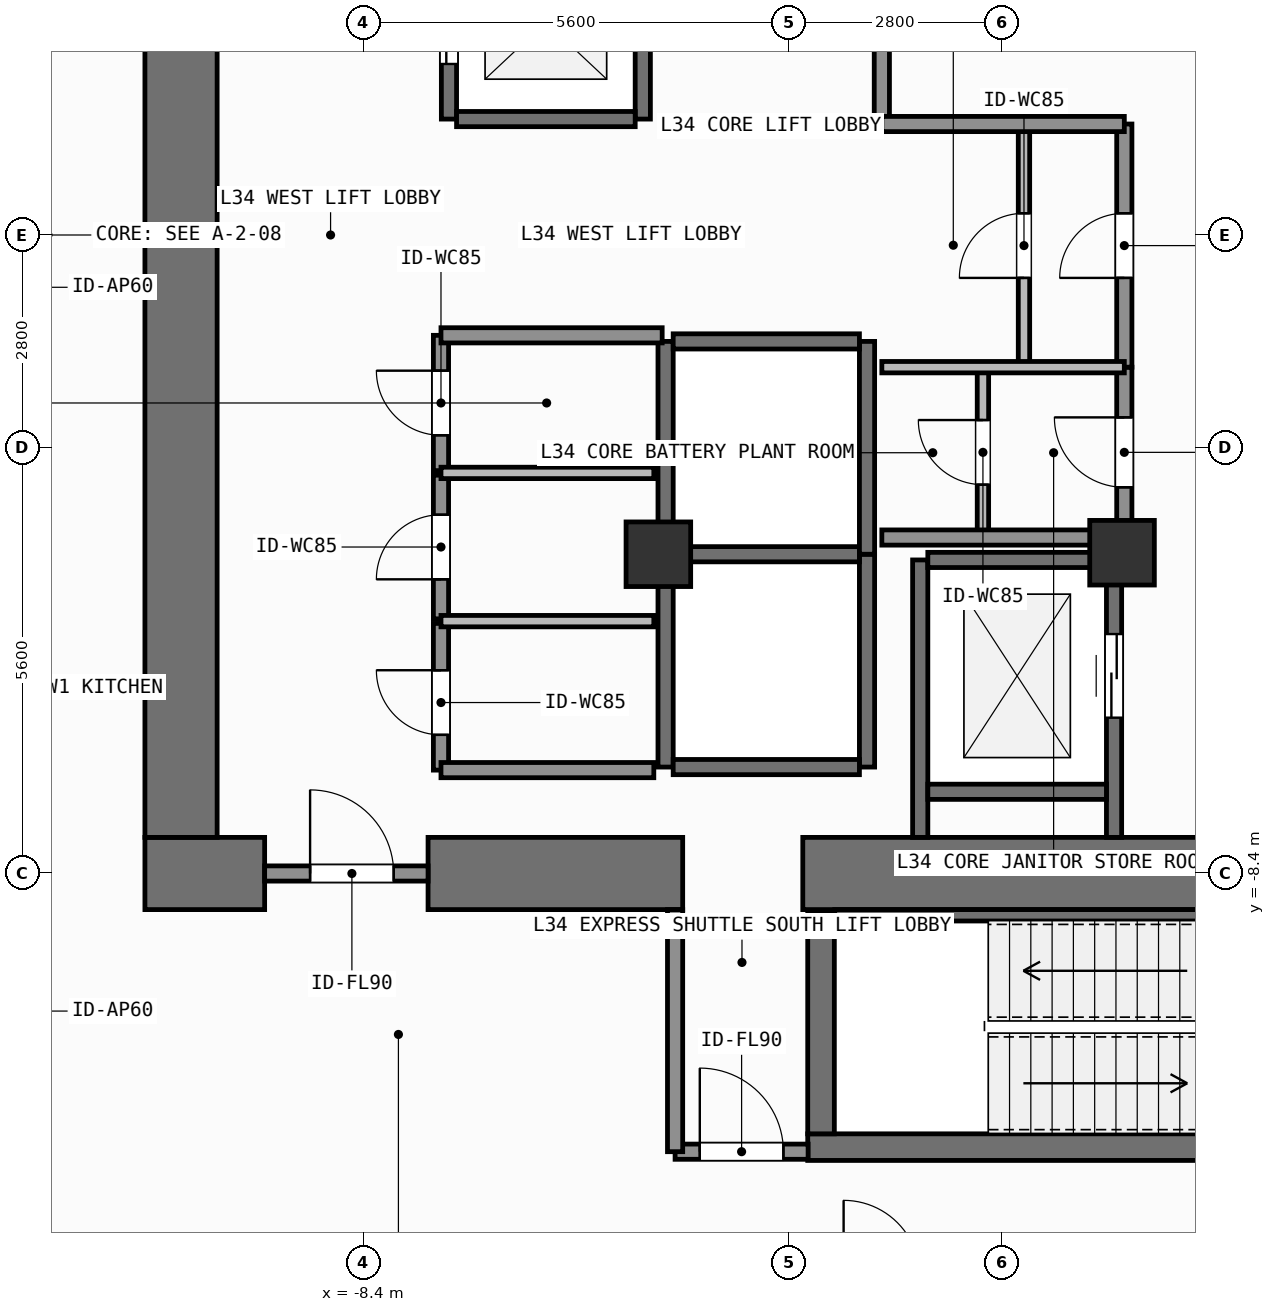
"""IFC4 building model, lengths in metres.
Left out: names, types, materials, properties, quantities, classifications, styles, units other than length and angle.
Written with IfcOpenShell. Run it as: python <this file> out.ifc"""

import sys

from ifc_helpers import new_model, si_unit, direction, frame, frame_2d, origin, origin_2d, place, context, subcontext, project, spatial, rectangle, extrude, element, fill, save


model = new_model("IFC4")
c1 = context("Model", 3, precision=1e-05, world=origin(), true_north=direction((0.0, 1.0)))
c2 = subcontext(c1, "Body", "Model", "MODEL_VIEW")
j1 = project(units=[si_unit("LENGTHUNIT", "METRE"), si_unit("PLANEANGLEUNIT", "RADIAN")], contexts=[c1])
p1 = place(None, origin())
s1 = spatial("IfcSite", under=j1, at=p1, CompositionType="ELEMENT")
p2 = place(p1, origin())
s2 = spatial("IfcBuilding", under=s1, at=p2, CompositionType="ELEMENT")
p3 = place(p2, frame((0.0, 0.0, 136.8)))
s3 = spatial("IfcBuildingStorey", under=s2, at=p3, CompositionType="ELEMENT", Elevation=136.8)
p4 = place(p3, frame((-11.275, -8.4, 0.0), z_axis=(0.0, 0.0, 1.0), x_axis=(1.0, 0.0, 0.0)))
e1 = element("IfcWall", 1, at=p4, inside=s3, PredefinedType="SHEAR", context=c2, shape_type="SweptSolid", body=[
    extrude(rectangle(XDim=1.575, YDim=0.95, at=frame_2d((0.788, 0.0))), origin(), (0.0, 0.0, 1.0), 3.9),
])
p5 = place(p3, frame((-7.55, -8.4, 0.0), z_axis=(0.0, 0.0, 1.0), x_axis=(1.0, 0.0, 0.0)))
e2 = element("IfcWall", 2, at=p5, inside=s3, PredefinedType="SHEAR", context=c2, shape_type="SweptSolid", body=[
    extrude(rectangle(XDim=3.35, YDim=0.95, at=frame_2d((1.675, 0.0))), origin(), (0.0, 0.0, 1.0), 3.9),
])
p6 = place(p3, frame((-2.62, -8.4, 0.0), z_axis=(0.0, 0.0, 1.0), x_axis=(1.0, 0.0, 0.0)))
e3 = element("IfcWall", 3, at=p6, inside=s3, PredefinedType="SHEAR", context=c2, shape_type="SweptSolid", body=[
    extrude(rectangle(XDim=7.27, YDim=0.95, at=frame_2d((3.635, 0.0))), origin(), (0.0, 0.0, 1.0), 3.9),
])
p7 = place(p3, frame((-10.8, -7.925, 0.0), z_axis=(0.0, 0.0, 1.0), x_axis=(0.0, 1.0, 0.0)))
e4 = element("IfcWall", 4, at=p7, inside=s3, PredefinedType="SHEAR", context=c2, shape_type="SweptSolid", body=[
    extrude(rectangle(XDim=15.85, YDim=0.95, at=frame_2d((7.925, 0.0))), origin(), (0.0, 0.0, 1.0), 3.9),
])
p8 = place(p3, frame((-2.555, -12.0, 0.0), z_axis=(0.0, 0.0, 1.0), x_axis=(1.0, 0.0, 0.0)))
e5 = element("IfcWall", 5, at=p8, inside=s3, PredefinedType="SHEAR", context=c2, shape_type="SweptSolid", body=[
    extrude(rectangle(XDim=7.31, YDim=0.35, at=frame_2d((3.655, 0.0))), origin(), (0.0, 0.0, 1.0), 3.9),
])
p9 = place(p3, frame((-2.2, -8.95, 0.0), z_axis=(0.0, 0.0, 1.0), x_axis=(1.0, 0.0, 0.0)))
e6 = element("IfcWall", 6, at=p9, inside=s3, PredefinedType="SHEAR", context=c2, shape_type="SweptSolid", body=[
    extrude(rectangle(XDim=6.6, YDim=0.15, at=frame_2d((3.3, 0.0))), origin(), (0.0, 0.0, 1.0), 3.9),
])
p10 = place(p3, frame((-2.38, -11.825, 0.0), z_axis=(0.0, 0.0, 1.0), x_axis=(0.0, 1.0, 0.0)))
e7 = element("IfcWall", 7, at=p10, inside=s3, PredefinedType="SHEAR", context=c2, shape_type="SweptSolid", body=[
    extrude(rectangle(XDim=2.925, YDim=0.35, at=frame_2d((1.462, 0.0))), origin(), (0.0, 0.0, 1.0), 3.9),
])
for number, where, z_axis, x_axis in (
    (8, (-4.52, -4.2, 0.0), (0.0, 0.0, 1.0), (1.0, 0.0, 0.0)),
    (9, (1.58, -4.18, 0.0), (0.0, 0.0, 1.0), (1.0, 0.0, 0.0)),
):
    element("IfcColumn", number, at=place(p3, frame(where, z_axis=z_axis, x_axis=x_axis)), inside=s3, PredefinedType="COLUMN", context=c2, shape_type="SweptSolid", body=[
        extrude(rectangle(XDim=0.85, YDim=0.85, at=origin_2d()), origin(), (0.0, 0.0, 1.0), 3.9),
    ])
p11 = place(p3, frame((-7.275, 1.525, 0.0), z_axis=(0.0, 0.0, 1.0), x_axis=(0.0, 1.0, 0.0)))
e10 = element("IfcWall", 10, at=p11, inside=s3, PredefinedType="SHEAR", context=c2, shape_type="SweptSolid", body=[
    extrude(rectangle(XDim=2.55, YDim=0.2, at=frame_2d((1.275, 0.0))), origin(), (0.0, 0.0, 1.0), 3.68),
])
p12 = place(p11, frame((0.725, 0.0, 0.0)))
e11 = element("IfcOpeningElement", 11, at=p12, cuts=e10, PredefinedType="OPENING", context=c2, shape_type="SweptSolid", body=[
    extrude(rectangle(XDim=1.1, YDim=2.2, at=frame_2d((0.55, 1.1))), frame((0.0, 0.11, 0.0), z_axis=(0.0, -1.0, 0.0), x_axis=(1.0, 0.0, 0.0)), (0.0, 0.0, 1.0), 0.22),
])
p13 = place(p3, frame((-4.725, 1.525, 0.0), z_axis=(0.0, 0.0, 1.0), x_axis=(0.0, 1.0, 0.0)))
e12 = element("IfcWall", 12, at=p13, inside=s3, PredefinedType="SHEAR", context=c2, shape_type="SweptSolid", body=[
    extrude(rectangle(XDim=2.55, YDim=0.2, at=frame_2d((1.275, 0.0))), origin(), (0.0, 0.0, 1.0), 3.68),
])
p14 = place(p3, frame((-7.175, 1.525, 0.0), z_axis=(0.0, 0.0, 1.0), x_axis=(1.0, 0.0, 0.0)))
e13 = element("IfcWall", 13, at=p14, inside=s3, PredefinedType="SHEAR", context=c2, shape_type="SweptSolid", body=[
    extrude(rectangle(XDim=2.35, YDim=0.2, at=frame_2d((1.175, 0.0))), origin(), (0.0, 0.0, 1.0), 3.68),
])
for number, where, z_axis, x_axis in (
    (14, (-4.425, -7.0, 0.0), (0.0, 0.0, 1.0), (0.0, 1.0, 0.0)),
    (15, (-1.775, -7.0, 0.0), (0.0, 0.0, 1.0), (0.0, 1.0, 0.0)),
):
    element("IfcWall", number, at=place(p3, frame(where, z_axis=z_axis, x_axis=x_axis)), inside=s3, PredefinedType="SHEAR", context=c2, shape_type="SweptSolid", body=[
        extrude(rectangle(XDim=2.8, YDim=0.2, at=frame_2d((1.4, 0.0))), origin(), (0.0, 0.0, 1.0), 3.68),
    ])
for number, where, z_axis, x_axis in (
    (16, (-4.325, -7.0, 0.0), (0.0, 0.0, 1.0), (1.0, 0.0, 0.0)),
    (17, (-4.325, -4.2, 0.0), (0.0, 0.0, 1.0), (1.0, 0.0, 0.0)),
):
    element("IfcWall", number, at=place(p3, frame(where, z_axis=z_axis, x_axis=x_axis)), inside=s3, PredefinedType="SHEAR", context=c2, shape_type="SweptSolid", body=[
        extrude(rectangle(XDim=2.45, YDim=0.2, at=frame_2d((1.225, 0.0))), origin(), (0.0, 0.0, 1.0), 3.68),
    ])
for number, where, z_axis, x_axis in (
    (18, (-4.425, -4.2, 0.0), (0.0, 0.0, 1.0), (0.0, 1.0, 0.0)),
    (19, (-1.775, -4.2, 0.0), (0.0, 0.0, 1.0), (0.0, 1.0, 0.0)),
):
    element("IfcWall", number, at=place(p3, frame(where, z_axis=z_axis, x_axis=x_axis)), inside=s3, PredefinedType="SHEAR", context=c2, shape_type="SweptSolid", body=[
        extrude(rectangle(XDim=2.8, YDim=0.2, at=frame_2d((1.4, 0.0))), origin(), (0.0, 0.0, 1.0), 3.68),
    ])
p15 = place(p3, frame((-4.325, -1.4, 0.0), z_axis=(0.0, 0.0, 1.0), x_axis=(1.0, 0.0, 0.0)))
e20 = element("IfcWall", 20, at=p15, inside=s3, PredefinedType="SHEAR", context=c2, shape_type="SweptSolid", body=[
    extrude(rectangle(XDim=2.45, YDim=0.2, at=frame_2d((1.225, 0.0))), origin(), (0.0, 0.0, 1.0), 3.68),
])
p16 = place(p3, frame((-1.075, -7.925, 0.0), z_axis=(0.0, 0.0, 1.0), x_axis=(0.0, 1.0, 0.0)))
e21 = element("IfcWall", 21, at=p16, inside=s3, PredefinedType="SHEAR", context=c2, shape_type="SweptSolid", body=[
    extrude(rectangle(XDim=3.65, YDim=0.2, at=frame_2d((1.825, 0.0))), origin(), (0.0, 0.0, 1.0), 3.68),
])
p17 = place(p3, frame((1.475, -7.925, 0.0), z_axis=(0.0, 0.0, 1.0), x_axis=(0.0, 1.0, 0.0)))
e22 = element("IfcWall", 22, at=p17, inside=s3, PredefinedType="SHEAR", context=c2, shape_type="SweptSolid", body=[
    extrude(rectangle(XDim=3.65, YDim=0.2, at=frame_2d((1.825, 0.0))), origin(), (0.0, 0.0, 1.0), 3.68),
])
p18 = place(p17, frame((1.575, 0.0, 0.0)))
e23 = element("IfcOpeningElement", 23, at=p18, cuts=e22, PredefinedType="OPENING", context=c2, shape_type="SweptSolid", body=[
    extrude(rectangle(XDim=1.1, YDim=2.2, at=frame_2d((0.55, 1.1))), frame((0.0, 0.11, 0.0), z_axis=(0.0, -1.0, 0.0), x_axis=(1.0, 0.0, 0.0)), (0.0, 0.0, 1.0), 0.22),
])
for number, where, z_axis, x_axis in (
    (24, (-0.975, -7.325, 0.0), (0.0, 0.0, 1.0), (1.0, 0.0, 0.0)),
    (25, (-0.975, -4.275, 0.0), (0.0, 0.0, 1.0), (1.0, 0.0, 0.0)),
):
    element("IfcWall", number, at=place(p3, frame(where, z_axis=z_axis, x_axis=x_axis)), inside=s3, PredefinedType="SHEAR", context=c2, shape_type="SweptSolid", body=[
        extrude(rectangle(XDim=2.35, YDim=0.2, at=frame_2d((1.175, 0.0))), origin(), (0.0, 0.0, 1.0), 3.68),
    ])
p19 = place(p3, frame((-9.7, -8.4, 0.0), z_axis=(0.0, 0.0, 1.0), x_axis=(1.0, 0.0, 0.0)))
e26 = element("IfcWall", 26, at=p19, inside=s3, PredefinedType="SOLIDWALL", context=c2, shape_type="SweptSolid", body=[
    extrude(rectangle(XDim=2.15, YDim=0.2, at=frame_2d((1.075, 0.0))), origin(), (0.0, 0.0, 1.0), 2.72),
])
p20 = place(p19, frame((0.598, 0.0, 0.0)))
e27 = element("IfcOpeningElement", 27, at=p20, cuts=e26, PredefinedType="OPENING", context=c2, shape_type="SweptSolid", body=[
    extrude(rectangle(XDim=1.1, YDim=2.15, at=frame_2d((0.55, 1.075))), frame((0.0, 0.11, 0.0), z_axis=(0.0, -1.0, 0.0), x_axis=(1.0, 0.0, 0.0)), (0.0, 0.0, 1.0), 0.22),
])
p21 = place(p3, frame((-4.3, -12.06, 0.0), z_axis=(0.0, 0.0, 1.0), x_axis=(1.0, 0.0, 0.0)))
e28 = element("IfcWall", 28, at=p21, inside=s3, PredefinedType="SOLIDWALL", context=c2, shape_type="SweptSolid", body=[
    extrude(rectangle(XDim=1.75, YDim=0.2, at=frame_2d((0.875, 0.0))), origin(), (0.0, 0.0, 1.0), 3.68),
])
p22 = place(p21, frame((0.325, 0.0, 0.0)))
e29 = element("IfcOpeningElement", 29, at=p22, cuts=e28, PredefinedType="OPENING", context=c2, shape_type="SweptSolid", body=[
    extrude(rectangle(XDim=1.1, YDim=2.15, at=frame_2d((0.55, 1.075))), frame((0.0, 0.11, 0.0), z_axis=(0.0, -1.0, 0.0), x_axis=(1.0, 0.0, 0.0)), (0.0, 0.0, 1.0), 0.22),
])
p23 = place(p3, frame((-0.25, -3.98, 0.0), z_axis=(0.0, 0.0, 1.0), x_axis=(0.0, 1.0, 0.0)))
e30 = element("IfcWall", 30, at=p23, inside=s3, PredefinedType="PARTITIONING", context=c2, shape_type="SweptSolid", body=[
    extrude(rectangle(XDim=2.241, YDim=0.15, at=frame_2d((1.121, 0.0))), origin(), (0.0, 0.0, 1.0), 3.68),
])
p24 = place(p23, frame((0.696, 0.0, 0.0)))
e31 = element("IfcOpeningElement", 31, at=p24, cuts=e30, PredefinedType="OPENING", context=c2, shape_type="SweptSolid", body=[
    extrude(rectangle(XDim=0.85, YDim=2.1, at=frame_2d((0.425, 1.05))), frame((0.0, 0.085, 0.0), z_axis=(0.0, -1.0, 0.0), x_axis=(1.0, 0.0, 0.0)), (0.0, 0.0, 1.0), 0.17),
])
p25 = place(p3, frame((0.29, -1.739, 0.0), z_axis=(0.0, 0.0, 1.0), x_axis=(0.0, 1.0, 0.0)))
e32 = element("IfcWall", 32, at=p25, inside=s3, PredefinedType="PARTITIONING", context=c2, shape_type="SweptSolid", body=[
    extrude(rectangle(XDim=3.199, YDim=0.15, at=frame_2d((1.6, 0.0))), origin(), (0.0, 0.0, 1.0), 3.68),
])
p26 = place(p25, frame((1.175, 0.0, 0.0)))
e33 = element("IfcOpeningElement", 33, at=p26, cuts=e32, PredefinedType="OPENING", context=c2, shape_type="SweptSolid", body=[
    extrude(rectangle(XDim=0.85, YDim=2.1, at=frame_2d((0.425, 1.05))), frame((0.0, 0.085, 0.0), z_axis=(0.0, -1.0, 0.0), x_axis=(1.0, 0.0, 0.0)), (0.0, 0.0, 1.0), 0.17),
])
p27 = place(p3, frame((1.61, -3.98, 0.0), z_axis=(0.0, 0.0, 1.0), x_axis=(0.0, 1.0, 0.0)))
e34 = element("IfcWall", 34, at=p27, inside=s3, PredefinedType="SOLIDWALL", context=c2, shape_type="SweptSolid", body=[
    extrude(rectangle(XDim=2.241, YDim=0.2, at=frame_2d((1.121, 0.0))), origin(), (0.0, 0.0, 1.0), 3.68),
])
p28 = place(p27, frame((0.66, 0.0, 0.0)))
e35 = element("IfcOpeningElement", 35, at=p28, cuts=e34, PredefinedType="OPENING", context=c2, shape_type="SweptSolid", body=[
    extrude(rectangle(XDim=0.92, YDim=2.1, at=frame_2d((0.46, 1.05))), frame((0.0, 0.11, 0.0), z_axis=(0.0, -1.0, 0.0), x_axis=(1.0, 0.0, 0.0)), (0.0, 0.0, 1.0), 0.22),
])
p29 = place(p3, frame((1.61, -1.739, 0.0), z_axis=(0.0, 0.0, 1.0), x_axis=(0.0, 1.0, 0.0)))
e36 = element("IfcWall", 36, at=p29, inside=s3, PredefinedType="SOLIDWALL", context=c2, shape_type="SweptSolid", body=[
    extrude(rectangle(XDim=3.199, YDim=0.2, at=frame_2d((1.6, 0.0))), origin(), (0.0, 0.0, 1.0), 3.68),
])
p30 = place(p29, frame((1.175, 0.0, 0.0)))
e37 = element("IfcOpeningElement", 37, at=p30, cuts=e36, PredefinedType="OPENING", context=c2, shape_type="SweptSolid", body=[
    extrude(rectangle(XDim=0.85, YDim=2.1, at=frame_2d((0.425, 1.05))), frame((0.0, 0.11, 0.0), z_axis=(0.0, -1.0, 0.0), x_axis=(1.0, 0.0, 0.0)), (0.0, 0.0, 1.0), 0.22),
])
p31 = place(p3, frame((-7.38, -7.04, 0.0), z_axis=(0.0, 0.0, 1.0), x_axis=(0.0, 1.0, 0.0)))
e38 = element("IfcWall", 38, at=p31, inside=s3, PredefinedType="SOLIDWALL", context=c2, shape_type="SweptSolid", body=[
    extrude(rectangle(XDim=1.93, YDim=0.2, at=frame_2d((0.965, 0.0))), origin(), (0.0, 0.0, 1.0), 3.68),
])
p32 = place(p31, frame((0.464, 0.0, 0.0)))
e39 = element("IfcOpeningElement", 39, at=p32, cuts=e38, PredefinedType="OPENING", context=c2, shape_type="SweptSolid", body=[
    extrude(rectangle(XDim=0.85, YDim=2.1, at=frame_2d((0.425, 1.05))), frame((0.0, 0.11, 0.0), z_axis=(0.0, -1.0, 0.0), x_axis=(1.0, 0.0, 0.0)), (0.0, 0.0, 1.0), 0.22),
])
p33 = place(p3, frame((-7.38, -5.05, 0.0), z_axis=(0.0, 0.0, 1.0), x_axis=(0.0, 1.0, 0.0)))
e40 = element("IfcWall", 40, at=p33, inside=s3, PredefinedType="SOLIDWALL", context=c2, shape_type="SweptSolid", body=[
    extrude(rectangle(XDim=1.89, YDim=0.2, at=frame_2d((0.945, 0.0))), origin(), (0.0, 0.0, 1.0), 3.68),
])
p34 = place(p33, frame((0.52, 0.0, 0.0)))
e41 = element("IfcOpeningElement", 41, at=p34, cuts=e40, PredefinedType="OPENING", context=c2, shape_type="SweptSolid", body=[
    extrude(rectangle(XDim=0.85, YDim=2.1, at=frame_2d((0.425, 1.05))), frame((0.0, 0.11, 0.0), z_axis=(0.0, -1.0, 0.0), x_axis=(1.0, 0.0, 0.0)), (0.0, 0.0, 1.0), 0.22),
])
p35 = place(p3, frame((-7.38, -3.1, 0.0), z_axis=(0.0, 0.0, 1.0), x_axis=(0.0, 1.0, 0.0)))
e42 = element("IfcWall", 42, at=p35, inside=s3, PredefinedType="SOLIDWALL", context=c2, shape_type="SweptSolid", body=[
    extrude(rectangle(XDim=1.78, YDim=0.2, at=frame_2d((0.89, 0.0))), origin(), (0.0, 0.0, 1.0), 3.68),
])
p36 = place(p35, frame((0.465, 0.0, 0.0)))
e43 = element("IfcOpeningElement", 43, at=p36, cuts=e42, PredefinedType="OPENING", context=c2, shape_type="SweptSolid", body=[
    extrude(rectangle(XDim=0.85, YDim=2.1, at=frame_2d((0.425, 1.05))), frame((0.0, 0.11, 0.0), z_axis=(0.0, -1.0, 0.0), x_axis=(1.0, 0.0, 0.0)), (0.0, 0.0, 1.0), 0.22),
])
p37 = place(p3, frame((-4.3, -12.06, 0.0), z_axis=(0.0, 0.0, 1.0), x_axis=(0.0, 1.0, 0.0)))
e44 = element("IfcWall", 44, at=p37, inside=s3, PredefinedType="SOLIDWALL", context=c2, shape_type="SweptSolid", body=[
    extrude(rectangle(XDim=3.185, YDim=0.2, at=frame_2d((1.593, 0.0))), origin(), (0.0, 0.0, 1.0), 3.68),
])
p38 = place(p3, frame((-7.38, -1.32, 0.0), z_axis=(0.0, 0.0, 1.0), x_axis=(1.0, 0.0, 0.0)))
e45 = element("IfcWall", 45, at=p38, inside=s3, PredefinedType="SOLIDWALL", context=c2, shape_type="SweptSolid", body=[
    extrude(rectangle(XDim=2.91, YDim=0.2, at=frame_2d((1.455, 0.0))), origin(), (0.0, 0.0, 1.0), 3.68),
])
p39 = place(p3, frame((-1.58, 1.48, 0.0), z_axis=(0.0, 0.0, 1.0), x_axis=(0.0, 1.0, 0.0)))
e46 = element("IfcWall", 46, at=p39, inside=s3, PredefinedType="SOLIDWALL", context=c2, shape_type="SweptSolid", body=[
    extrude(rectangle(XDim=2.7, YDim=0.2, at=frame_2d((1.35, 0.0))), origin(), (0.0, 0.0, 1.0), 3.68),
])
for number, where, z_axis, x_axis in (
    (47, (-1.58, -3.98, 0.0), (0.0, 0.0, 1.0), (1.0, 0.0, 0.0)),
    (48, (-1.58, 1.46, 0.0), (0.0, 0.0, 1.0), (1.0, 0.0, 0.0)),
):
    element("IfcWall", number, at=place(p3, frame(where, z_axis=z_axis, x_axis=x_axis)), inside=s3, PredefinedType="SOLIDWALL", context=c2, shape_type="SweptSolid", body=[
        extrude(rectangle(XDim=3.19, YDim=0.2, at=frame_2d((1.595, 0.0))), origin(), (0.0, 0.0, 1.0), 3.68),
    ])
p40 = place(p3, frame((-1.58, -1.739, 0.0), z_axis=(0.0, 0.0, 1.0), x_axis=(1.0, 0.0, 0.0)))
e49 = element("IfcWall", 49, at=p40, inside=s3, PredefinedType="PARTITIONING", context=c2, shape_type="SweptSolid", body=[
    extrude(rectangle(XDim=3.19, YDim=0.15, at=frame_2d((1.595, 0.0))), origin(), (0.0, 0.0, 1.0), 3.68),
])
p41 = place(p3, frame((-7.38, -7.04, 0.0), z_axis=(0.0, 0.0, 1.0), x_axis=(1.0, 0.0, 0.0)))
e50 = element("IfcWall", 50, at=p41, inside=s3, PredefinedType="SOLIDWALL", context=c2, shape_type="SweptSolid", body=[
    extrude(rectangle(XDim=2.8, YDim=0.2, at=frame_2d((1.4, 0.0))), origin(), (0.0, 0.0, 1.0), 3.68),
])
for number, where, z_axis, x_axis in (
    (51, (-7.38, -5.08, 0.0), (0.0, 0.0, 1.0), (1.0, 0.0, 0.0)),
    (52, (-7.38, -3.13, 0.0), (0.0, 0.0, 1.0), (1.0, 0.0, 0.0)),
):
    element("IfcWall", number, at=place(p3, frame(where, z_axis=z_axis, x_axis=x_axis)), inside=s3, PredefinedType="PARTITIONING", context=c2, shape_type="SweptSolid", body=[
        extrude(rectangle(XDim=2.8, YDim=0.15, at=frame_2d((1.4, 0.0))), origin(), (0.0, 0.0, 1.0), 3.68),
    ])
p42 = place(p12, origin())
e53 = element("IfcDoor", 53, at=p42, inside=s3, OperationType="SLIDING_TO_LEFT", PredefinedType="DOOR", context=c2, shape_type="SweptSolid", body=[
    extrude(rectangle(XDim=1.1, YDim=2.2, at=frame_2d((0.55, 1.1))), frame((0.0, 0.025, 0.0), z_axis=(0.0, -1.0, 0.0), x_axis=(1.0, 0.0, 0.0)), (0.0, 0.0, 1.0), 0.05),
])
fill(e11, e53)
p43 = place(p18, origin())
e54 = element("IfcDoor", 54, at=p43, inside=s3, OperationType="SLIDING_TO_LEFT", PredefinedType="DOOR", context=c2, shape_type="SweptSolid", body=[
    extrude(rectangle(XDim=1.1, YDim=2.2, at=frame_2d((0.55, 1.1))), frame((0.0, 0.025, 0.0), z_axis=(0.0, -1.0, 0.0), x_axis=(1.0, 0.0, 0.0)), (0.0, 0.0, 1.0), 0.05),
])
fill(e23, e54)
p44 = place(p20, origin())
e55 = element("IfcDoor", 55, at=p44, inside=s3, OperationType="SINGLE_SWING_LEFT", PredefinedType="DOOR", context=c2, shape_type="SweptSolid", body=[
    extrude(rectangle(XDim=1.1, YDim=2.15, at=frame_2d((0.55, 1.075))), frame((0.0, 0.025, 0.0), z_axis=(0.0, -1.0, 0.0), x_axis=(1.0, 0.0, 0.0)), (0.0, 0.0, 1.0), 0.05),
])
fill(e27, e55)
p45 = place(p22, origin())
e56 = element("IfcDoor", 56, at=p45, inside=s3, OperationType="SINGLE_SWING_LEFT", PredefinedType="DOOR", context=c2, shape_type="SweptSolid", body=[
    extrude(rectangle(XDim=1.1, YDim=2.15, at=frame_2d((0.55, 1.075))), frame((0.0, 0.025, 0.0), z_axis=(0.0, -1.0, 0.0), x_axis=(1.0, 0.0, 0.0)), (0.0, 0.0, 1.0), 0.05),
])
fill(e29, e56)
p46 = place(p24, origin())
e57 = element("IfcDoor", 57, at=p46, inside=s3, OperationType="SINGLE_SWING_RIGHT", PredefinedType="DOOR", context=c2, shape_type="SweptSolid", body=[
    extrude(rectangle(XDim=0.85, YDim=2.1, at=frame_2d((0.425, 1.05))), frame((0.0, 0.025, 0.0), z_axis=(0.0, -1.0, 0.0), x_axis=(1.0, 0.0, 0.0)), (0.0, 0.0, 1.0), 0.05),
])
fill(e31, e57)
p47 = place(p26, origin())
e58 = element("IfcDoor", 58, at=p47, inside=s3, OperationType="SINGLE_SWING_LEFT", PredefinedType="DOOR", context=c2, shape_type="SweptSolid", body=[
    extrude(rectangle(XDim=0.85, YDim=2.1, at=frame_2d((0.425, 1.05))), frame((0.0, 0.025, 0.0), z_axis=(0.0, -1.0, 0.0), x_axis=(1.0, 0.0, 0.0)), (0.0, 0.0, 1.0), 0.05),
])
fill(e33, e58)
p48 = place(p28, origin())
e59 = element("IfcDoor", 59, at=p48, inside=s3, OperationType="SINGLE_SWING_RIGHT", PredefinedType="DOOR", context=c2, shape_type="SweptSolid", body=[
    extrude(rectangle(XDim=0.92, YDim=2.1, at=frame_2d((0.46, 1.05))), frame((0.0, 0.025, 0.0), z_axis=(0.0, -1.0, 0.0), x_axis=(1.0, 0.0, 0.0)), (0.0, 0.0, 1.0), 0.05),
])
fill(e35, e59)
p49 = place(p30, origin())
e60 = element("IfcDoor", 60, at=p49, inside=s3, OperationType="SINGLE_SWING_LEFT", PredefinedType="DOOR", context=c2, shape_type="SweptSolid", body=[
    extrude(rectangle(XDim=0.85, YDim=2.1, at=frame_2d((0.425, 1.05))), frame((0.0, 0.025, 0.0), z_axis=(0.0, -1.0, 0.0), x_axis=(1.0, 0.0, 0.0)), (0.0, 0.0, 1.0), 0.05),
])
fill(e37, e60)
p50 = place(p32, origin())
e61 = element("IfcDoor", 61, at=p50, inside=s3, OperationType="SINGLE_SWING_RIGHT", PredefinedType="DOOR", context=c2, shape_type="SweptSolid", body=[
    extrude(rectangle(XDim=0.85, YDim=2.1, at=frame_2d((0.425, 1.05))), frame((0.0, 0.025, 0.0), z_axis=(0.0, -1.0, 0.0), x_axis=(1.0, 0.0, 0.0)), (0.0, 0.0, 1.0), 0.05),
])
fill(e39, e61)
p51 = place(p34, origin())
e62 = element("IfcDoor", 62, at=p51, inside=s3, OperationType="SINGLE_SWING_LEFT", PredefinedType="DOOR", context=c2, shape_type="SweptSolid", body=[
    extrude(rectangle(XDim=0.85, YDim=2.1, at=frame_2d((0.425, 1.05))), frame((0.0, 0.025, 0.0), z_axis=(0.0, -1.0, 0.0), x_axis=(1.0, 0.0, 0.0)), (0.0, 0.0, 1.0), 0.05),
])
fill(e41, e62)
p52 = place(p36, origin())
e63 = element("IfcDoor", 63, at=p52, inside=s3, OperationType="SINGLE_SWING_RIGHT", PredefinedType="DOOR", context=c2, shape_type="SweptSolid", body=[
    extrude(rectangle(XDim=0.85, YDim=2.1, at=frame_2d((0.425, 1.05))), frame((0.0, 0.025, 0.0), z_axis=(0.0, -1.0, 0.0), x_axis=(1.0, 0.0, 0.0)), (0.0, 0.0, 1.0), 0.05),
])
fill(e43, e63)
save(model, sys.argv[1])
